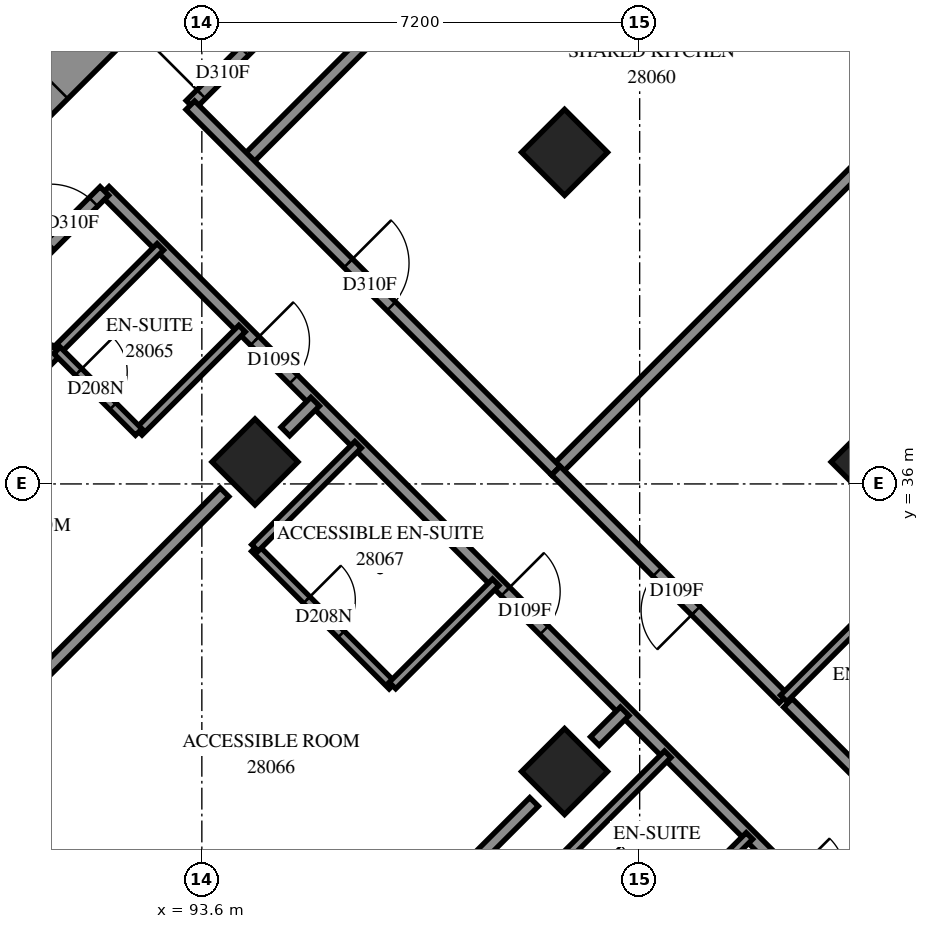
"""IFC4 building model, lengths in metres.
Left out: names, types, materials, properties, quantities, classifications, styles, units other than length and angle.
Written with IfcOpenShell. Run it as: python <this file> out.ifc"""

import sys

from ifc_helpers import new_model, si_unit, direction, frame, frame_2d, origin, origin_2d, place, context, subcontext, project, spatial, polyline, rectangle, outline, extrude, element, fill, save


model = new_model("IFC4")
c1 = context("Model", 3, precision=1e-05, world=origin(), true_north=direction((0.0, 1.0)))
c2 = subcontext(c1, "Body", "Model", "MODEL_VIEW")
j1 = project(units=[si_unit("LENGTHUNIT", "METRE"), si_unit("PLANEANGLEUNIT", "RADIAN")], contexts=[c1])
p1 = place(None, origin())
s1 = spatial("IfcSite", under=j1, at=p1, CompositionType="ELEMENT")
p2 = place(p1, origin())
s2 = spatial("IfcBuilding", under=s1, at=p2, CompositionType="ELEMENT")
p3 = place(p2, frame((0.0, 0.0, 105.0)))
s3 = spatial("IfcBuildingStorey", under=s2, at=p3, CompositionType="ELEMENT", Elevation=105.0)
for number, where, z_axis, x_axis in (
    (1, (99.565, 41.453, 0.0), (0.0, 0.0, 1.0), (0.707, -0.707, 0.0)),
    (2, (94.474, 36.362, 0.0), (0.0, 0.0, 1.0), (0.707, -0.707, 0.0)),
    (3, (104.656, 36.362, 0.0), (0.0, 0.0, 1.0), (0.707, -0.707, 0.0)),
    (4, (99.565, 31.271, 0.0), (0.0, 0.0, 1.0), (0.707, -0.707, 0.0)),
):
    element("IfcColumn", number, at=place(p3, frame(where, z_axis=z_axis, x_axis=x_axis)), inside=s3, PredefinedType="COLUMN", context=c2, shape_type="SweptSolid", body=[
        extrude(rectangle(XDim=1.0, YDim=1.0, at=origin_2d()), origin(), (0.0, 0.0, 1.0), 3.1),
    ])
p4 = place(p3, frame((87.12, 38.625, -0.3), z_axis=(0.0, 0.0, 1.0), x_axis=(0.7071067812, 0.7071067812, 0.0)))
e5 = element("IfcWall", 5, at=p4, inside=s3, PredefinedType="SHEAR", context=c2, shape_type="SweptSolid", body=[
    extrude(rectangle(XDim=14.4, YDim=0.8, at=frame_2d((7.2, 0.0))), origin(), (0.0, 0.0, 1.0), 2.7),
])
p5 = place(p4, frame((4.55, 0.0, 0.3)))
e6 = element("IfcOpeningElement", 6, at=p5, cuts=e5, PredefinedType="OPENING", context=c2, shape_type="SweptSolid", body=[
    extrude(rectangle(XDim=1.1, YDim=2.1, at=frame_2d((0.55, 1.05))), frame((0.0, 0.41, 0.0), z_axis=(0.0, -1.0, 0.0), x_axis=(1.0, 0.0, 0.0)), (0.0, 0.0, 1.0), 0.82),
])
p6 = place(p4, frame((11.35, 0.0, 0.3)))
e7 = element("IfcOpeningElement", 7, at=p6, cuts=e5, PredefinedType="OPENING", context=c2, shape_type="SweptSolid", body=[
    extrude(rectangle(XDim=1.1, YDim=2.1, at=frame_2d((0.55, 1.05))), frame((0.0, 0.41, 0.0), z_axis=(0.0, -1.0, 0.0), x_axis=(1.0, 0.0, 0.0)), (0.0, 0.0, 1.0), 0.82),
])
p7 = place(p3, frame((88.257, 30.367, 0.0), z_axis=(0.0, 0.0, 1.0), x_axis=(0.7923412761, -0.6100781116, 0.0)))
e8 = element("IfcWall", 8, at=p7, inside=s3, PredefinedType="SOLIDWALL", context=c2, shape_type="SweptSolid", body=[
    extrude(outline(polyline([(-0.036, -0.275), (3.937, -0.275), (4.008, 0.275), (0.036, 0.275), (-0.036, -0.275)])), origin(), (0.0, 0.0, 1.0), 3.1),
])
p8 = place(p7, frame((0.604, 0.0, 0.5)))
e9 = element("IfcOpeningElement", 9, at=p8, cuts=e8, PredefinedType="OPENING", context=c2, shape_type="SweptSolid", body=[
    extrude(rectangle(XDim=1.3, YDim=2.45, at=frame_2d((0.65, 1.225))), frame((0.0, 0.285, 0.0), z_axis=(0.0, -1.0, 0.0), x_axis=(1.0, 0.0, 0.0)), (0.0, 0.0, 1.0), 0.57),
])
p9 = place(p7, frame((2.104, 0.0, 0.5)))
e10 = element("IfcOpeningElement", 10, at=p9, cuts=e8, PredefinedType="OPENING", context=c2, shape_type="SweptSolid", body=[
    extrude(rectangle(XDim=1.3, YDim=2.45, at=frame_2d((0.65, 1.225))), frame((0.0, 0.285, 0.0), z_axis=(0.0, -1.0, 0.0), x_axis=(1.0, 0.0, 0.0)), (0.0, 0.0, 1.0), 0.57),
])
p10 = place(p3, frame((92.004, 40.819, 0.0), z_axis=(0.0, 0.0, 1.0), x_axis=(0.7071067812, -0.7071067812, 0.0)))
e11 = element("IfcWall", 11, at=p10, inside=s3, PredefinedType="PARTITIONING", context=c2, shape_type="SweptSolid", body=[
    extrude(rectangle(XDim=19.298, YDim=0.2, at=frame_2d((9.649, 0.0))), origin(), (0.0, 0.0, 1.0), 3.1),
])
p11 = place(p10, frame((3.489, 0.0, 0.0)))
e12 = element("IfcOpeningElement", 12, at=p11, cuts=e11, PredefinedType="OPENING", context=c2, shape_type="SweptSolid", body=[
    extrude(rectangle(XDim=0.9, YDim=2.1, at=frame_2d((0.45, 1.05))), frame((0.0, 0.11, 0.0), z_axis=(0.0, -1.0, 0.0), x_axis=(1.0, 0.0, 0.0)), (0.0, 0.0, 1.0), 0.22),
])
p12 = place(p10, frame((9.319, 0.0, 0.0)))
e13 = element("IfcOpeningElement", 13, at=p12, cuts=e11, PredefinedType="OPENING", context=c2, shape_type="SweptSolid", body=[
    extrude(rectangle(XDim=0.9, YDim=2.1, at=frame_2d((0.45, 1.05))), frame((0.0, 0.11, 0.0), z_axis=(0.0, -1.0, 0.0), x_axis=(1.0, 0.0, 0.0)), (0.0, 0.0, 1.0), 0.22),
])
p13 = place(p10, frame((15.961, 0.0, 0.0)))
e14 = element("IfcOpeningElement", 14, at=p13, cuts=e11, PredefinedType="OPENING", context=c2, shape_type="SweptSolid", body=[
    extrude(rectangle(XDim=0.9, YDim=2.1, at=frame_2d((0.45, 1.05))), frame((0.0, 0.11, 0.0), z_axis=(0.0, -1.0, 0.0), x_axis=(1.0, 0.0, 0.0)), (0.0, 0.0, 1.0), 0.22),
])
p14 = place(p3, frame((99.423, 36.221, 0.0), z_axis=(0.0, 0.0, 1.0), x_axis=(0.7071067812, 0.7071067812, 0.0)))
e15 = element("IfcWall", 15, at=p14, inside=s3, PredefinedType="PARTITIONING", context=c2, shape_type="SweptSolid", body=[
    extrude(rectangle(XDim=12.099, YDim=0.2, at=frame_2d((6.049, 0.0))), origin(), (0.0, 0.0, 1.0), 3.1),
])
p15 = place(p3, frame((94.331, 41.313, 0.0), z_axis=(0.0, 0.0, 1.0), x_axis=(0.7071109333, 0.7071026291, 0.0)))
e16 = element("IfcWall", 16, at=p15, inside=s3, PredefinedType="PARTITIONING", context=c2, shape_type="SweptSolid", body=[
    extrude(rectangle(XDim=12.042, YDim=0.2, at=frame_2d((6.021, 0.0))), origin(), (0.0, 0.0, 1.0), 3.1),
])
p16 = place(p3, frame((93.413, 42.233, 0.0), z_axis=(0.0, 0.0, 1.0), x_axis=(0.7071067812, 0.7071067812, 0.0)))
e17 = element("IfcWall", 17, at=p16, inside=s3, PredefinedType="PARTITIONING", context=c2, shape_type="SweptSolid", body=[
    extrude(rectangle(XDim=9.699, YDim=0.2, at=frame_2d((4.849, 0.0))), origin(), (0.0, 0.0, 1.0), 3.1),
])
p17 = place(p16, frame((0.249, 0.0, 0.0)))
e18 = element("IfcOpeningElement", 18, at=p17, cuts=e17, PredefinedType="OPENING", context=c2, shape_type="SweptSolid", body=[
    extrude(rectangle(XDim=1.0, YDim=2.1, at=frame_2d((0.5, 1.05))), frame((0.0, 0.11, 0.0), z_axis=(0.0, -1.0, 0.0), x_axis=(1.0, 0.0, 0.0)), (0.0, 0.0, 1.0), 0.22),
])
p18 = place(p3, frame((93.411, 42.227, 0.0), z_axis=(0.0, 0.0, 1.0), x_axis=(0.7071067812, -0.7071067812, 0.0)))
e19 = element("IfcWall", 19, at=p18, inside=s3, PredefinedType="PARTITIONING", context=c2, shape_type="SweptSolid", body=[
    extrude(rectangle(XDim=8.499, YDim=0.2, at=frame_2d((4.25, 0.0))), origin(), (0.0, 0.0, 1.0), 3.1),
])
p19 = place(p18, frame((3.672, 0.0, 0.0)))
e20 = element("IfcOpeningElement", 20, at=p19, cuts=e19, PredefinedType="OPENING", context=c2, shape_type="SweptSolid", body=[
    extrude(rectangle(XDim=1.0, YDim=2.1, at=frame_2d((0.5, 1.05))), frame((0.0, 0.11, 0.0), z_axis=(0.0, -1.0, 0.0), x_axis=(1.0, 0.0, 0.0)), (0.0, 0.0, 1.0), 0.22),
])
p20 = place(p3, frame((86.835, 35.655, 0.0), z_axis=(0.0, 0.0, 1.0), x_axis=(0.7071067812, 0.7071067812, 0.0)))
e21 = element("IfcWall", 21, at=p20, inside=s3, PredefinedType="PARTITIONING", context=c2, shape_type="SweptSolid", body=[
    extrude(rectangle(XDim=7.3, YDim=0.2, at=frame_2d((3.65, 0.0))), origin(), (0.0, 0.0, 1.0), 3.1),
])
p21 = place(p20, frame((6.046, 0.0, 0.0)))
e22 = element("IfcOpeningElement", 22, at=p21, cuts=e21, PredefinedType="OPENING", context=c2, shape_type="SweptSolid", body=[
    extrude(rectangle(XDim=1.0, YDim=2.1, at=frame_2d((0.5, 1.05))), frame((0.0, 0.11, 0.0), z_axis=(0.0, -1.0, 0.0), x_axis=(1.0, 0.0, 0.0)), (0.0, 0.0, 1.0), 0.22),
])
p22 = place(p3, frame((86.336, 33.313, 0.0), z_axis=(0.0, 0.0, 1.0), x_axis=(0.7069620306, 0.7072515022, 0.0)))
e23 = element("IfcWall", 23, at=p22, inside=s3, PredefinedType="PARTITIONING", context=c2, shape_type="SweptSolid", body=[
    extrude(rectangle(XDim=6.909, YDim=0.2, at=frame_2d((3.454, 0.0))), origin(), (0.0, 0.0, 1.0), 3.1),
])
p23 = place(p3, frame((89.881, 31.771, 0.0), z_axis=(0.0, 0.0, 1.0), x_axis=(0.7071067812, 0.7071067812, 0.0)))
e24 = element("IfcWall", 24, at=p23, inside=s3, PredefinedType="PARTITIONING", context=c2, shape_type="SweptSolid", body=[
    extrude(rectangle(XDim=5.787, YDim=0.2, at=frame_2d((2.893, 0.0))), origin(), (0.0, 0.0, 1.0), 3.1),
])
p24 = place(p3, frame((94.973, 26.681, 0.0), z_axis=(0.0, 0.0, 1.0), x_axis=(0.7071067812, 0.7071067812, 0.0)))
e25 = element("IfcWall", 25, at=p24, inside=s3, PredefinedType="PARTITIONING", context=c2, shape_type="SweptSolid", body=[
    extrude(rectangle(XDim=5.784, YDim=0.2, at=frame_2d((2.892, 0.0))), origin(), (0.0, 0.0, 1.0), 3.1),
])
p25 = place(p3, frame((103.239, 32.399, 0.0), z_axis=(0.0, 0.0, 1.0), x_axis=(0.7071067812, -0.7071067812, 0.0)))
e26 = element("IfcWall", 26, at=p25, inside=s3, PredefinedType="PARTITIONING", context=c2, shape_type="SweptSolid", body=[
    extrude(rectangle(XDim=5.399, YDim=0.2, at=frame_2d((2.7, 0.0))), origin(), (0.0, 0.0, 1.0), 3.1),
])
p26 = place(p25, frame((2.15, 0.0, 0.0)))
e27 = element("IfcOpeningElement", 27, at=p26, cuts=e26, PredefinedType="OPENING", context=c2, shape_type="SweptSolid", body=[
    extrude(rectangle(XDim=0.9, YDim=2.1, at=frame_2d((0.45, 1.05))), frame((0.0, 0.11, 0.0), z_axis=(0.0, -1.0, 0.0), x_axis=(1.0, 0.0, 0.0)), (0.0, 0.0, 1.0), 0.22),
])
p27 = place(p3, frame((103.168, 32.47, 0.0), z_axis=(0.0, 0.0, 1.0), x_axis=(-0.7067858967, 0.7074275201, 0.0)))
e28 = element("IfcWall", 28, at=p27, inside=s3, PredefinedType="PARTITIONING", context=c2, shape_type="SweptSolid", body=[
    extrude(rectangle(XDim=5.299, YDim=0.2, at=frame_2d((2.65, 0.0))), origin(), (0.0, 0.0, 1.0), 3.1),
])
p28 = place(p27, frame((2.043, 0.0, 0.0)))
e29 = element("IfcOpeningElement", 29, at=p28, cuts=e28, PredefinedType="OPENING", context=c2, shape_type="SweptSolid", body=[
    extrude(rectangle(XDim=0.9, YDim=2.1, at=frame_2d((0.45, 1.05))), frame((0.0, 0.11, 0.0), z_axis=(0.0, -1.0, 0.0), x_axis=(1.0, 0.0, 0.0)), (0.0, 0.0, 1.0), 0.22),
])
p29 = place(p3, frame((94.471, 34.945, 0.0), z_axis=(0.0, 0.0, 1.0), x_axis=(0.7067942478, -0.7074191764, 0.0)))
e30 = element("IfcWall", 30, at=p29, inside=s3, PredefinedType="PARTITIONING", context=c2, shape_type="SweptSolid", body=[
    extrude(rectangle(XDim=3.2, YDim=0.15, at=frame_2d((1.6, 0.0))), origin(), (0.0, 0.0, 1.0), 3.1),
])
p30 = place(p29, frame((1.206, 0.0, 0.0)))
e31 = element("IfcOpeningElement", 31, at=p30, cuts=e30, PredefinedType="OPENING", context=c2, shape_type="SweptSolid", body=[
    extrude(rectangle(XDim=0.8, YDim=2.1, at=frame_2d((0.4, 1.05))), frame((0.0, 0.085, 0.0), z_axis=(0.0, -1.0, 0.0), x_axis=(1.0, 0.0, 0.0)), (0.0, 0.0, 1.0), 0.17),
])
for number, where, z_axis, x_axis in (
    (32, (92.563, 36.857, 0.0), (0.0, 0.0, 1.0), (0.707, 0.707, 0.0)),
    (33, (91.219, 38.201, 0.0), (0.0, 0.0, 1.0), (0.707, 0.707, 0.0)),
    (34, (96.735, 32.685, 0.0), (0.0, 0.0, 1.0), (0.707, 0.707, 0.0)),
    (35, (103.169, 32.473, 0.0), (0.0, 0.0, 1.0), (0.707, 0.707, 0.0)),
    (36, (99.563, 29.857, 0.0), (0.0, 0.0, 1.0), (0.707, 0.707, 0.0)),
    (37, (100.907, 28.513, 0.0), (0.0, 0.0, 1.0), (0.707, 0.707, 0.0)),
):
    element("IfcWall", number, at=place(p3, frame(where, z_axis=z_axis, x_axis=x_axis)), inside=s3, PredefinedType="PARTITIONING", context=c2, shape_type="SweptSolid", body=[
        extrude(rectangle(XDim=2.401, YDim=0.15, at=frame_2d((1.201, 0.0))), origin(), (0.0, 0.0, 1.0), 3.1),
    ])
p31 = place(p3, frame((94.473, 34.949, 0.0), z_axis=(0.0, 0.0, 1.0), x_axis=(0.7071067812, 0.7071067812, 0.0)))
e38 = element("IfcWall", 38, at=p31, inside=s3, PredefinedType="PARTITIONING", context=c2, shape_type="SweptSolid", body=[
    extrude(rectangle(XDim=2.398, YDim=0.15, at=frame_2d((1.199, 0.0))), origin(), (0.0, 0.0, 1.0), 3.1),
])
p32 = place(p3, frame((91.217, 38.197, 0.0), z_axis=(0.0, 0.0, 1.0), x_axis=(0.7071067812, -0.7071067812, 0.0)))
e39 = element("IfcWall", 39, at=p32, inside=s3, PredefinedType="PARTITIONING", context=c2, shape_type="SweptSolid", body=[
    extrude(rectangle(XDim=1.901, YDim=0.15, at=frame_2d((0.95, 0.0))), origin(), (0.0, 0.0, 1.0), 3.1),
])
p33 = place(p32, frame((0.502, 0.0, 0.0)))
e40 = element("IfcOpeningElement", 40, at=p33, cuts=e39, PredefinedType="OPENING", context=c2, shape_type="SweptSolid", body=[
    extrude(rectangle(XDim=0.8, YDim=2.1, at=frame_2d((0.4, 1.05))), frame((0.0, 0.085, 0.0), z_axis=(0.0, -1.0, 0.0), x_axis=(1.0, 0.0, 0.0)), (0.0, 0.0, 1.0), 0.17),
])
for number, where, z_axis, x_axis in (
    (41, (94.973, 36.863, 0.0), (0.0, 0.0, 1.0), (0.707, 0.707, 0.0)),
    (42, (100.063, 31.771, 0.0), (0.0, 0.0, 1.0), (0.707, 0.707, 0.0)),
):
    element("IfcWall", number, at=place(p3, frame(where, z_axis=z_axis, x_axis=x_axis)), inside=s3, PredefinedType="PARTITIONING", context=c2, shape_type="SweptSolid", body=[
        extrude(rectangle(XDim=0.693, YDim=0.2, at=frame_2d((0.346, 0.0))), origin(), (0.0, 0.0, 1.0), 3.1),
    ])
p34 = place(p17, origin())
e43 = element("IfcDoor", 43, at=p34, inside=s3, OperationType="SINGLE_SWING_LEFT", PredefinedType="DOOR", context=c2, shape_type="SweptSolid", body=[
    extrude(rectangle(XDim=1.0, YDim=2.1, at=frame_2d((0.5, 1.05))), frame((0.0, 0.025, 0.0), z_axis=(0.0, -1.0, 0.0), x_axis=(1.0, 0.0, 0.0)), (0.0, 0.0, 1.0), 0.05),
])
fill(e18, e43)
p35 = place(p19, origin())
e44 = element("IfcDoor", 44, at=p35, inside=s3, OperationType="SINGLE_SWING_RIGHT", PredefinedType="DOOR", context=c2, shape_type="SweptSolid", body=[
    extrude(rectangle(XDim=1.0, YDim=2.1, at=frame_2d((0.5, 1.05))), frame((0.0, 0.025, 0.0), z_axis=(0.0, -1.0, 0.0), x_axis=(1.0, 0.0, 0.0)), (0.0, 0.0, 1.0), 0.05),
])
fill(e20, e44)
p36 = place(p28, origin())
e45 = element("IfcDoor", 45, at=p36, inside=s3, OperationType="SINGLE_SWING_RIGHT", PredefinedType="DOOR", context=c2, shape_type="SweptSolid", body=[
    extrude(rectangle(XDim=0.9, YDim=2.1, at=frame_2d((0.45, 1.05))), frame((0.0, 0.025, 0.0), z_axis=(0.0, -1.0, 0.0), x_axis=(1.0, 0.0, 0.0)), (0.0, 0.0, 1.0), 0.05),
])
fill(e29, e45)
p37 = place(p21, origin())
e46 = element("IfcDoor", 46, at=p37, inside=s3, OperationType="SINGLE_SWING_RIGHT", PredefinedType="DOOR", context=c2, shape_type="SweptSolid", body=[
    extrude(rectangle(XDim=1.0, YDim=2.1, at=frame_2d((0.5, 1.05))), frame((0.0, 0.025, 0.0), z_axis=(0.0, -1.0, 0.0), x_axis=(1.0, 0.0, 0.0)), (0.0, 0.0, 1.0), 0.05),
])
fill(e22, e46)
p38 = place(p11, origin())
e47 = element("IfcDoor", 47, at=p38, inside=s3, OperationType="SINGLE_SWING_LEFT", PredefinedType="DOOR", context=c2, shape_type="SweptSolid", body=[
    extrude(rectangle(XDim=0.9, YDim=2.1, at=frame_2d((0.45, 1.05))), frame((0.0, 0.025, 0.0), z_axis=(0.0, -1.0, 0.0), x_axis=(1.0, 0.0, 0.0)), (0.0, 0.0, 1.0), 0.05),
])
fill(e12, e47)
p39 = place(p33, origin())
e48 = element("IfcDoor", 48, at=p39, inside=s3, OperationType="SINGLE_SWING_RIGHT", PredefinedType="DOOR", context=c2, shape_type="SweptSolid", body=[
    extrude(rectangle(XDim=0.8, YDim=2.1, at=frame_2d((0.4, 1.05))), frame((0.0, 0.025, 0.0), z_axis=(0.0, -1.0, 0.0), x_axis=(1.0, 0.0, 0.0)), (0.0, 0.0, 1.0), 0.05),
])
fill(e40, e48)
p40 = place(p12, origin())
e49 = element("IfcDoor", 49, at=p40, inside=s3, OperationType="SINGLE_SWING_RIGHT", PredefinedType="DOOR", context=c2, shape_type="SweptSolid", body=[
    extrude(rectangle(XDim=0.9, YDim=2.1, at=frame_2d((0.45, 1.05))), frame((0.0, 0.025, 0.0), z_axis=(0.0, -1.0, 0.0), x_axis=(1.0, 0.0, 0.0)), (0.0, 0.0, 1.0), 0.05),
])
fill(e13, e49)
p41 = place(p30, origin())
e50 = element("IfcDoor", 50, at=p41, inside=s3, OperationType="SINGLE_SWING_RIGHT", PredefinedType="DOOR", context=c2, shape_type="SweptSolid", body=[
    extrude(rectangle(XDim=0.8, YDim=2.1, at=frame_2d((0.4, 1.05))), frame((0.0, 0.025, 0.0), z_axis=(0.0, -1.0, 0.0), x_axis=(1.0, 0.0, 0.0)), (0.0, 0.0, 1.0), 0.05),
])
fill(e31, e50)
save(model, sys.argv[1])
